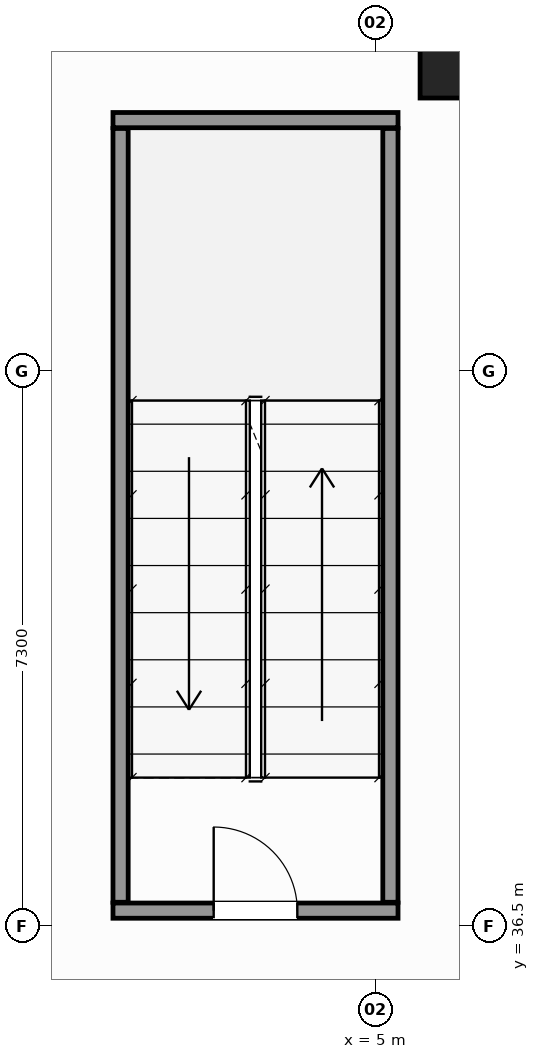
"""IFC4 building model, lengths in metres.
Left out: names, types, materials, properties, quantities, classifications, styles, units other than length and angle.
Written with IfcOpenShell. Run it as: python <this file> out.ifc"""

import sys

from ifc_helpers import new_model, si_unit, direction, frame, frame_2d, origin, origin_2d, place, context, subcontext, project, spatial, rectangle, hollow_circle, extrude, source, transform, mapped, element, fill, save


model = new_model("IFC4")
c1 = context("Model", 3, precision=1e-05, world=origin(), true_north=direction((0.0, 1.0)))
c2 = subcontext(c1, "Body", "Model", "MODEL_VIEW")
j1 = project(units=[si_unit("LENGTHUNIT", "METRE"), si_unit("PLANEANGLEUNIT", "RADIAN")], contexts=[c1])
p1 = place(None, origin())
s1 = spatial("IfcSite", under=j1, at=p1, CompositionType="ELEMENT")
p2 = place(p1, origin())
s2 = spatial("IfcBuilding", under=s1, at=p2, CompositionType="ELEMENT")
p3 = place(p2, frame((0.0, 0.0, -5.2)))
s3 = spatial("IfcBuildingStorey", under=s2, at=p3, CompositionType="ELEMENT", Elevation=-5.2)
m1 = source(origin(), c2, "Body", "SweptSolid", [
    extrude(hollow_circle(Radius=0.61, WallThickness=0.05, at=origin_2d()), origin(), (0.0, 0.0, 1.0), 5.2),
])
p4 = place(p3, frame((6.2, 48.0, 0.0), z_axis=(0.0, 0.0, 1.0), x_axis=(1.0, 0.0, 0.0)))
e1 = element("IfcColumn", 1, at=p4, inside=s3, PredefinedType="COLUMN", context=c2, shape_type="MappedRepresentation", body=[
    mapped(m1, transform((0.0, 0.0, 0.0), scale=1.0)),
])
p5 = place(p3, frame((1.55, 36.7, 0.0), z_axis=(0.0, 0.0, 1.0), x_axis=(1.0, 0.0, 0.0)))
e2 = element("IfcWall", 2, at=p5, inside=s3, PredefinedType="SOLIDWALL", context=c2, shape_type="SweptSolid", body=[
    extrude(rectangle(XDim=3.75, YDim=0.2, at=frame_2d((1.875, 0.0))), origin(), (0.0, 0.0, 1.0), 5.2),
])
p6 = place(p5, frame((1.325, 0.0, 0.0)))
e3 = element("IfcOpeningElement", 3, at=p6, cuts=e2, PredefinedType="OPENING", context=c2, shape_type="SweptSolid", body=[
    extrude(rectangle(XDim=1.1, YDim=2.15, at=frame_2d((0.55, 1.075))), frame((0.0, 0.11, 0.0), z_axis=(0.0, -1.0, 0.0), x_axis=(1.0, 0.0, 0.0)), (0.0, 0.0, 1.0), 0.22),
])
p7 = place(p3, frame((1.55, 47.1, 0.0), z_axis=(0.0, 0.0, 1.0), x_axis=(1.0, 0.0, 0.0)))
e4 = element("IfcWall", 4, at=p7, inside=s3, PredefinedType="SOLIDWALL", context=c2, shape_type="SweptSolid", body=[
    extrude(rectangle(XDim=3.75, YDim=0.2, at=frame_2d((1.875, 0.0))), origin(), (0.0, 0.0, 1.0), 5.2),
])
for number, where, z_axis, x_axis in (
    (5, (1.65, 36.81, 0.0), (0.0, 0.0, 1.0), (0.0, 1.0, 0.0)),
    (6, (5.2, 36.81, 0.0), (0.0, 0.0, 1.0), (0.0, 1.0, 0.0)),
):
    element("IfcWall", number, at=place(p3, frame(where, z_axis=z_axis, x_axis=x_axis)), inside=s3, PredefinedType="SOLIDWALL", context=c2, shape_type="SweptSolid", body=[
        extrude(rectangle(XDim=10.18, YDim=0.2, at=frame_2d((5.09, 0.0))), origin(), (0.0, 0.0, 1.0), 5.2),
    ])
m2 = source(origin(), c2, "Body", "SweptSolid", [
    extrude(rectangle(XDim=1.1, YDim=2.15, at=frame_2d((0.55, 1.075))), frame((0.0, 0.025, 0.0), z_axis=(0.0, -1.0, 0.0), x_axis=(1.0, 0.0, 0.0)), (0.0, 0.0, 1.0), 0.05),
])
p8 = place(p6, origin())
e7 = element("IfcDoor", 7, at=p8, inside=s3, OperationType="SINGLE_SWING_LEFT", PredefinedType="DOOR", context=c2, shape_type="MappedRepresentation", body=[
    mapped(m2, transform((0.0, 0.0, 0.0), scale=1.0)),
])
fill(e3, e7)
save(model, sys.argv[1])
